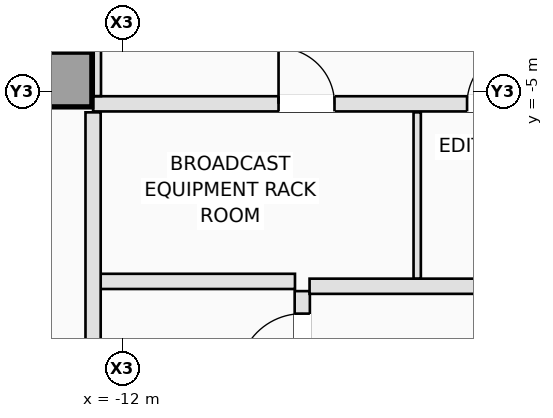
"""IFC4 building model, lengths in metres.
Left out: names, types, materials, properties, quantities, classifications, styles, units other than length and angle.
Written with IfcOpenShell. Run it as: python <this file> out.ifc"""

import sys

from ifc_helpers import new_model, si_unit, direction, frame, frame_2d, origin, origin_2d, place, context, subcontext, project, spatial, rectangle, extrude, element, fill, save


model = new_model("IFC4")
c1 = context("Model", 3, precision=1e-05, world=origin(), true_north=direction((0.0, 1.0)))
c2 = subcontext(c1, "Body", "Model", "MODEL_VIEW")
j1 = project(units=[si_unit("LENGTHUNIT", "METRE"), si_unit("PLANEANGLEUNIT", "RADIAN")], contexts=[c1])
p1 = place(None, origin())
s1 = spatial("IfcSite", under=j1, at=p1, CompositionType="ELEMENT")
p2 = place(p1, origin())
s2 = spatial("IfcBuilding", under=s1, at=p2, CompositionType="ELEMENT")
p3 = place(p2, frame((0.0, 0.0, 183.4)))
s3 = spatial("IfcBuildingStorey", under=s2, at=p3, CompositionType="ELEMENT", Elevation=183.4)
p4 = place(p3, frame((-12.95, -4.8, 0.0), z_axis=(0.0, 0.0, 1.0), x_axis=(1.0, 0.0, 0.0)))
e1 = element("IfcColumn", 1, at=p4, inside=s3, PredefinedType="COLUMN", context=c2, shape_type="SweptSolid", body=[
    extrude(rectangle(XDim=0.9, YDim=0.9, at=origin_2d()), origin(), (0.0, 0.0, 1.0), 3.5),
])
p5 = place(p3, frame((-9.04, -10.18, 0.0), z_axis=(0.0, 0.0, 1.0), x_axis=(0.0, 1.0, 0.0)))
e2 = element("IfcWall", 2, at=p5, inside=s3, PredefinedType="PARTITIONING", context=c2, shape_type="SweptSolid", body=[
    extrude(rectangle(XDim=1.9, YDim=0.25, at=frame_2d((0.95, 0.0))), origin(), (0.0, 0.0, 1.0), 3.25),
])
p6 = place(p5, frame((0.48, 0.0, 0.0)))
e3 = element("IfcOpeningElement", 3, at=p6, cuts=e2, PredefinedType="OPENING", context=c2, shape_type="SweptSolid", body=[
    extrude(rectangle(XDim=1.05, YDim=2.15, at=frame_2d((0.525, 1.075))), frame((0.0, 0.135, 0.0), z_axis=(0.0, -1.0, 0.0), x_axis=(1.0, 0.0, 0.0)), (0.0, 0.0, 1.0), 0.27),
])
p7 = place(p3, frame((-12.38, -8.12, 0.0), z_axis=(0.0, 0.0, 1.0), x_axis=(1.0, 0.0, 0.0)))
e4 = element("IfcWall", 4, at=p7, inside=s3, PredefinedType="PARTITIONING", context=c2, shape_type="SweptSolid", body=[
    extrude(rectangle(XDim=3.22, YDim=0.25, at=frame_2d((1.61, 0.0))), origin(), (0.0, 0.0, 1.0), 3.25),
])
p8 = place(p3, frame((-12.48, -10.18, 0.0), z_axis=(0.0, 0.0, 1.0), x_axis=(0.0, 1.0, 0.0)))
e5 = element("IfcWall", 5, at=p8, inside=s3, PredefinedType="PARTITIONING", context=c2, shape_type="SweptSolid", body=[
    extrude(rectangle(XDim=4.84, YDim=0.25, at=frame_2d((2.42, 0.0))), origin(), (0.0, 0.0, 1.0), 3.25),
])
p9 = place(p3, frame((-8.92, -8.2, 0.0), z_axis=(0.0, 0.0, 1.0), x_axis=(1.0, 0.0, 0.0)))
e6 = element("IfcWall", 6, at=p9, inside=s3, PredefinedType="PARTITIONING", context=c2, shape_type="SweptSolid", body=[
    extrude(rectangle(XDim=5.24, YDim=0.25, at=frame_2d((2.62, 0.0))), origin(), (0.0, 0.0, 1.0), 3.25),
])
p10 = place(p3, frame((-12.48, -5.2, 0.0), z_axis=(0.0, 0.0, 1.0), x_axis=(1.0, 0.0, 0.0)))
e7 = element("IfcWall", 7, at=p10, inside=s3, PredefinedType="PARTITIONING", context=c2, shape_type="SweptSolid", body=[
    extrude(rectangle(XDim=8.278, YDim=0.25, at=frame_2d((4.139, 0.0))), origin(), (0.0, 0.0, 1.0), 3.25),
])
p11 = place(p10, frame((3.05, 0.0, 0.0)))
e8 = element("IfcOpeningElement", 8, at=p11, cuts=e7, PredefinedType="OPENING", context=c2, shape_type="SweptSolid", body=[
    extrude(rectangle(XDim=0.92, YDim=2.12, at=frame_2d((0.46, 1.06))), frame((0.0, 0.135, 0.0), z_axis=(0.0, -1.0, 0.0), x_axis=(1.0, 0.0, 0.0)), (0.0, 0.0, 1.0), 0.27),
])
p12 = place(p10, frame((6.15, 0.0, 0.0)))
e9 = element("IfcOpeningElement", 9, at=p12, cuts=e7, PredefinedType="OPENING", context=c2, shape_type="SweptSolid", body=[
    extrude(rectangle(XDim=0.92, YDim=2.12, at=frame_2d((0.46, 1.06))), frame((0.0, 0.135, 0.0), z_axis=(0.0, -1.0, 0.0), x_axis=(1.0, 0.0, 0.0)), (0.0, 0.0, 1.0), 0.27),
])
p13 = place(p3, frame((-7.15, -8.073, 0.0), z_axis=(0.0, 0.0, 1.0), x_axis=(0.0, 1.0, 0.0)))
e10 = element("IfcWall", 10, at=p13, inside=s3, PredefinedType="PARTITIONING", context=c2, shape_type="SweptSolid", body=[
    extrude(rectangle(XDim=2.733, YDim=0.12, at=frame_2d((1.366, 0.0))), origin(), (0.0, 0.0, 1.0), 3.25),
])
p14 = place(p3, frame((-12.41, -5.073, 0.0), z_axis=(0.0, 0.0, 1.0), x_axis=(0.0, 1.0, 0.0)))
e11 = element("IfcWall", 11, at=p14, inside=s3, PredefinedType="PARTITIONING", context=c2, shape_type="SweptSolid", body=[
    extrude(rectangle(XDim=2.673, YDim=0.12, at=frame_2d((1.336, 0.0))), origin(), (0.0, 0.0, 1.0), 3.25),
])
p15 = place(p6, origin())
e12 = element("IfcDoor", 12, at=p15, inside=s3, OperationType="SINGLE_SWING_LEFT", PredefinedType="DOOR", context=c2, shape_type="SweptSolid", body=[
    extrude(rectangle(XDim=1.05, YDim=2.15, at=frame_2d((0.525, 1.075))), frame((0.0, 0.025, 0.0), z_axis=(0.0, -1.0, 0.0), x_axis=(1.0, 0.0, 0.0)), (0.0, 0.0, 1.0), 0.05),
])
fill(e3, e12)
p16 = place(p11, origin())
e13 = element("IfcDoor", 13, at=p16, inside=s3, OperationType="SINGLE_SWING_LEFT", PredefinedType="DOOR", context=c2, shape_type="SweptSolid", body=[
    extrude(rectangle(XDim=0.92, YDim=2.12, at=frame_2d((0.46, 1.06))), frame((0.0, 0.025, 0.0), z_axis=(0.0, -1.0, 0.0), x_axis=(1.0, 0.0, 0.0)), (0.0, 0.0, 1.0), 0.05),
])
fill(e8, e13)
p17 = place(p12, origin())
e14 = element("IfcDoor", 14, at=p17, inside=s3, OperationType="SINGLE_SWING_RIGHT", PredefinedType="DOOR", context=c2, shape_type="SweptSolid", body=[
    extrude(rectangle(XDim=0.92, YDim=2.12, at=frame_2d((0.46, 1.06))), frame((0.0, 0.025, 0.0), z_axis=(0.0, -1.0, 0.0), x_axis=(1.0, 0.0, 0.0)), (0.0, 0.0, 1.0), 0.05),
])
fill(e9, e14)
save(model, sys.argv[1])
